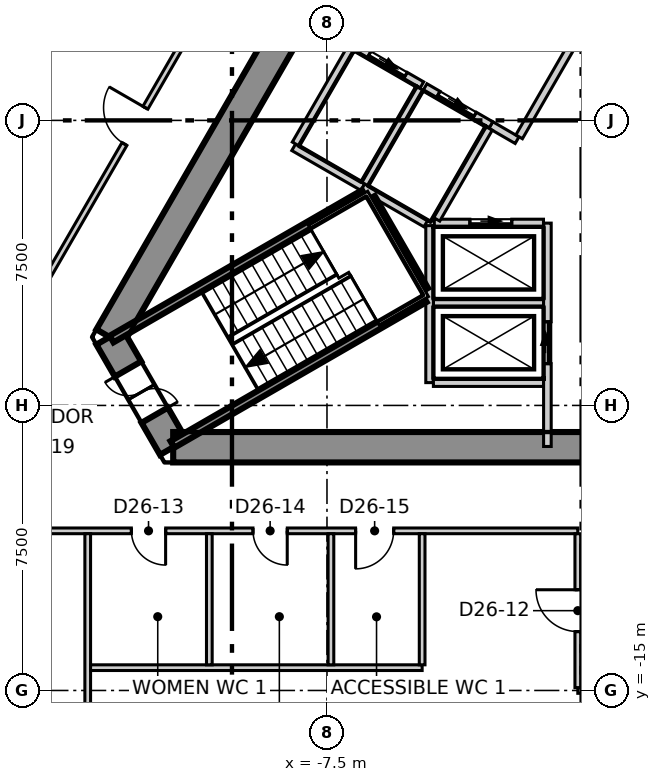
"""IFC4 building model, lengths in metres.
Left out: names, types, materials, properties, quantities, classifications, styles, units other than length and angle.
Written with IfcOpenShell. Run it as: python <this file> out.ifc"""

import sys

from ifc_helpers import new_model, si_unit, direction, frame, frame_2d, origin, place, context, subcontext, project, spatial, polyline, rectangle, outline, extrude, element, fill, save


model = new_model("IFC4")
c1 = context("Model", 3, precision=1e-05, world=origin(), true_north=direction((0.0, 1.0)))
c2 = subcontext(c1, "Body", "Model", "MODEL_VIEW")
j1 = project(units=[si_unit("LENGTHUNIT", "METRE"), si_unit("PLANEANGLEUNIT", "RADIAN")], contexts=[c1])
p1 = place(None, origin())
s1 = spatial("IfcSite", under=j1, at=p1, CompositionType="ELEMENT")
p2 = place(p1, origin())
s2 = spatial("IfcBuilding", under=s1, at=p2, CompositionType="ELEMENT")
p3 = place(p2, frame((0.0, 0.0, 116.3)))
s3 = spatial("IfcBuildingStorey", under=s2, at=p3, CompositionType="ELEMENT", Elevation=116.3)
p4 = place(p3, frame((-1.674, 14.3, -0.3), z_axis=(0.0, 0.0, 1.0), x_axis=(-0.499995765644, -0.866027848477, 0.0)))
e1 = element("IfcWall", 1, at=p4, inside=s3, PredefinedType="SHEAR", context=c2, shape_type="SweptSolid", body=[
    extrude(outline(polyline([(-0.231, -0.4), (1.732, -0.4), (3.695, -0.4), (5.658, -0.4), (7.621, -0.4), (9.584, -0.4), (11.547, -0.4), (13.51, -0.4), (15.473, -0.4), (17.436, -0.4), (19.399, -0.4), (21.362, -0.4), (23.325, -0.4), (22.863, 0.4), (20.977, 0.4), (19.091, 0.4), (17.205, 0.4), (15.319, 0.4), (13.433, 0.4), (11.547, 0.4), (9.661, 0.4), (7.775, 0.4), (5.889, 0.4), (4.003, 0.4), (2.117, 0.4), (0.231, 0.4), (-0.231, -0.4)])), origin(), (0.0, 0.0, 1.0), 4.0),
])
p5 = place(p4, frame((10.997, 0.0, 0.3)))
e2 = element("IfcOpeningElement", 2, at=p5, cuts=e1, PredefinedType="OPENING", context=c2, shape_type="SweptSolid", body=[
    extrude(rectangle(XDim=1.1, YDim=2.1, at=frame_2d((0.55, 1.05))), frame((0.0, 0.41, 0.0), z_axis=(0.0, -1.0, 0.0), x_axis=(1.0, 0.0, 0.0)), (0.0, 0.0, 1.0), 0.82),
])
p6 = place(p3, frame((-13.221, -5.7, -0.3), z_axis=(0.0, 0.0, 1.0), x_axis=(0.49987182685, -0.866099391942, 0.0)))
e3 = element("IfcWall", 3, at=p6, inside=s3, PredefinedType="SHEAR", context=c2, shape_type="SweptSolid", body=[
    extrude(outline(polyline([(-0.231, -0.4), (1.674, -0.4), (3.579, -0.4), (3.118, 0.4), (1.674, 0.4), (0.231, 0.4), (-0.231, -0.4)])), origin(), (0.0, 0.0, 1.0), 4.0),
])
p7 = place(p6, frame((0.974, 0.0, 0.3)))
e4 = element("IfcOpeningElement", 4, at=p7, cuts=e3, PredefinedType="OPENING", context=c2, shape_type="SweptSolid", body=[
    extrude(rectangle(XDim=1.4, YDim=2.1, at=frame_2d((0.7, 1.05))), frame((0.0, 0.41, 0.0), z_axis=(0.0, -1.0, 0.0), x_axis=(1.0, 0.0, 0.0)), (0.0, 0.0, 1.0), 0.82),
])
p8 = place(p3, frame((-11.547, -8.6, -0.3), z_axis=(0.0, 0.0, 1.0), x_axis=(1.0, 0.0, 0.0)))
e5 = element("IfcWall", 5, at=p8, inside=s3, PredefinedType="SHEAR", context=c2, shape_type="SweptSolid", body=[
    extrude(outline(polyline([(-0.231, -0.4), (1.732, -0.4), (3.695, -0.4), (5.658, -0.4), (7.621, -0.4), (9.584, -0.4), (11.547, -0.4), (13.51, -0.4), (15.473, -0.4), (17.436, -0.4), (19.399, -0.4), (21.362, -0.4), (23.325, -0.4), (22.863, 0.4), (20.977, 0.4), (19.091, 0.4), (17.205, 0.4), (15.319, 0.4), (13.433, 0.4), (11.547, 0.4), (9.661, 0.4), (7.775, 0.4), (5.889, 0.4), (4.003, 0.4), (2.117, 0.4), (0.231, 0.4), (-0.231, -0.4)])), origin(), (0.0, 0.0, 1.0), 4.0),
])
p9 = place(p8, frame((18.76, 0.0, 0.3)))
e6 = element("IfcOpeningElement", 6, at=p9, cuts=e5, PredefinedType="OPENING", context=c2, shape_type="SweptSolid", body=[
    extrude(rectangle(XDim=0.9, YDim=2.1, at=frame_2d((0.45, 1.05))), frame((0.0, 0.41, 0.0), z_axis=(0.0, -1.0, 0.0), x_axis=(1.0, 0.0, 0.0)), (0.0, 0.0, 1.0), 0.82),
])
p10 = place(p3, frame((-3.154, 35.185, 0.0), z_axis=(0.0, 0.0, 1.0), x_axis=(-0.499996704161, -0.866027306629, 0.0)))
e7 = element("IfcWall", 7, at=p10, inside=s3, PredefinedType="ELEMENTEDWALL", context=c2, shape_type="SweptSolid", body=[
    extrude(rectangle(XDim=57.769, YDim=0.2, at=frame_2d((28.884, 0.0))), origin(), (0.0, 0.0, 1.0), 3.7),
])
p11 = place(p10, frame((2.301, 0.0, 0.9)))
e8 = element("IfcOpeningElement", 8, at=p11, cuts=e7, PredefinedType="OPENING", context=c2, shape_type="SweptSolid", body=[
    extrude(rectangle(XDim=4.9, YDim=2.5, at=frame_2d((2.45, 1.25))), frame((0.0, 0.11, 0.0), z_axis=(0.0, -1.0, 0.0), x_axis=(1.0, 0.0, 0.0)), (0.0, 0.0, 1.0), 0.22),
])
p12 = place(p10, frame((9.199, 0.0, 0.9)))
e9 = element("IfcOpeningElement", 9, at=p12, cuts=e7, PredefinedType="OPENING", context=c2, shape_type="SweptSolid", body=[
    extrude(rectangle(XDim=4.9, YDim=2.5, at=frame_2d((2.45, 1.25))), frame((0.0, 0.11, 0.0), z_axis=(0.0, -1.0, 0.0), x_axis=(1.0, 0.0, 0.0)), (0.0, 0.0, 1.0), 0.22),
])
p13 = place(p10, frame((16.097, 0.0, 0.9)))
e10 = element("IfcOpeningElement", 10, at=p13, cuts=e7, PredefinedType="OPENING", context=c2, shape_type="SweptSolid", body=[
    extrude(rectangle(XDim=4.9, YDim=2.5, at=frame_2d((2.45, 1.25))), frame((0.0, 0.11, 0.0), z_axis=(0.0, -1.0, 0.0), x_axis=(1.0, 0.0, 0.0)), (0.0, 0.0, 1.0), 0.22),
])
p14 = place(p10, frame((22.995, 0.0, 0.9)))
e11 = element("IfcOpeningElement", 11, at=p14, cuts=e7, PredefinedType="OPENING", context=c2, shape_type="SweptSolid", body=[
    extrude(rectangle(XDim=4.9, YDim=2.5, at=frame_2d((2.45, 1.25))), frame((0.0, 0.11, 0.0), z_axis=(0.0, -1.0, 0.0), x_axis=(1.0, 0.0, 0.0)), (0.0, 0.0, 1.0), 0.22),
])
p15 = place(p10, frame((29.893, 0.0, 0.9)))
e12 = element("IfcOpeningElement", 12, at=p15, cuts=e7, PredefinedType="OPENING", context=c2, shape_type="SweptSolid", body=[
    extrude(rectangle(XDim=4.9, YDim=2.5, at=frame_2d((2.45, 1.25))), frame((0.0, 0.11, 0.0), z_axis=(0.0, -1.0, 0.0), x_axis=(1.0, 0.0, 0.0)), (0.0, 0.0, 1.0), 0.22),
])
p16 = place(p10, frame((36.791, 0.0, 0.9)))
e13 = element("IfcOpeningElement", 13, at=p16, cuts=e7, PredefinedType="OPENING", context=c2, shape_type="SweptSolid", body=[
    extrude(rectangle(XDim=4.9, YDim=2.5, at=frame_2d((2.45, 1.25))), frame((0.0, 0.11, 0.0), z_axis=(0.0, -1.0, 0.0), x_axis=(1.0, 0.0, 0.0)), (0.0, 0.0, 1.0), 0.22),
])
p17 = place(p10, frame((43.689, 0.0, 0.9)))
e14 = element("IfcOpeningElement", 14, at=p17, cuts=e7, PredefinedType="OPENING", context=c2, shape_type="SweptSolid", body=[
    extrude(rectangle(XDim=4.9, YDim=2.5, at=frame_2d((2.45, 1.25))), frame((0.0, 0.11, 0.0), z_axis=(0.0, -1.0, 0.0), x_axis=(1.0, 0.0, 0.0)), (0.0, 0.0, 1.0), 0.22),
])
p18 = place(p10, frame((50.586, 0.0, 0.9)))
e15 = element("IfcOpeningElement", 15, at=p18, cuts=e7, PredefinedType="OPENING", context=c2, shape_type="SweptSolid", body=[
    extrude(rectangle(XDim=4.9, YDim=2.5, at=frame_2d((2.45, 1.25))), frame((0.0, 0.11, 0.0), z_axis=(0.0, -1.0, 0.0), x_axis=(1.0, 0.0, 0.0)), (0.0, 0.0, 1.0), 0.22),
])
p19 = place(p3, frame((-18.555, -10.8, 0.0), z_axis=(0.0, 0.0, 1.0), x_axis=(1.0, 0.0, 0.0)))
e16 = element("IfcWall", 16, at=p19, inside=s3, PredefinedType="PARTITIONING", context=c2, shape_type="SweptSolid", body=[
    extrude(rectangle(XDim=17.654, YDim=0.15, at=frame_2d((8.827, 0.0))), origin(), (0.0, 0.0, 1.0), 3.7),
])
p20 = place(p19, frame((1.8, 0.0, 0.0)))
e17 = element("IfcOpeningElement", 17, at=p20, cuts=e16, PredefinedType="OPENING", context=c2, shape_type="SweptSolid", body=[
    extrude(rectangle(XDim=1.1, YDim=2.1, at=frame_2d((0.55, 1.05))), frame((0.0, 0.085, 0.0), z_axis=(0.0, -1.0, 0.0), x_axis=(1.0, 0.0, 0.0)), (0.0, 0.0, 1.0), 0.17),
])
p21 = place(p19, frame((5.909, 0.0, 0.0)))
e18 = element("IfcOpeningElement", 18, at=p21, cuts=e16, PredefinedType="OPENING", context=c2, shape_type="SweptSolid", body=[
    extrude(rectangle(XDim=0.9, YDim=2.1, at=frame_2d((0.45, 1.05))), frame((0.0, 0.085, 0.0), z_axis=(0.0, -1.0, 0.0), x_axis=(1.0, 0.0, 0.0)), (0.0, 0.0, 1.0), 0.17),
])
p22 = place(p19, frame((9.109, 0.0, 0.0)))
e19 = element("IfcOpeningElement", 19, at=p22, cuts=e16, PredefinedType="OPENING", context=c2, shape_type="SweptSolid", body=[
    extrude(rectangle(XDim=0.9, YDim=2.1, at=frame_2d((0.45, 1.05))), frame((0.0, 0.085, 0.0), z_axis=(0.0, -1.0, 0.0), x_axis=(1.0, 0.0, 0.0)), (0.0, 0.0, 1.0), 0.17),
])
p23 = place(p19, frame((11.809, 0.0, 0.0)))
e20 = element("IfcOpeningElement", 20, at=p23, cuts=e16, PredefinedType="OPENING", context=c2, shape_type="SweptSolid", body=[
    extrude(rectangle(XDim=1.0, YDim=2.1, at=frame_2d((0.5, 1.05))), frame((0.0, 0.085, 0.0), z_axis=(0.0, -1.0, 0.0), x_axis=(1.0, 0.0, 0.0)), (0.0, 0.0, 1.0), 0.17),
])
p24 = place(p3, frame((-18.631, -10.67, 0.0), z_axis=(0.0, 0.0, 1.0), x_axis=(0.499981532133, 0.86603606595, 0.0)))
e21 = element("IfcWall", 21, at=p24, inside=s3, PredefinedType="PARTITIONING", context=c2, shape_type="SweptSolid", body=[
    extrude(rectangle(XDim=24.553, YDim=0.15, at=frame_2d((12.277, 0.0))), origin(), (0.0, 0.0, 1.0), 3.7),
])
p25 = place(p24, frame((11.604, 0.0, 0.0)))
e22 = element("IfcOpeningElement", 22, at=p25, cuts=e21, PredefinedType="OPENING", context=c2, shape_type="SweptSolid", body=[
    extrude(rectangle(XDim=1.1, YDim=2.1, at=frame_2d((0.55, 1.05))), frame((0.0, 0.085, 0.0), z_axis=(0.0, -1.0, 0.0), x_axis=(1.0, 0.0, 0.0)), (0.0, 0.0, 1.0), 0.17),
])
p26 = place(p3, frame((-13.796, -20.244, 0.0), z_axis=(0.0, 0.0, 1.0), x_axis=(0.0, 1.0, 0.0)))
e23 = element("IfcWall", 23, at=p26, inside=s3, PredefinedType="PARTITIONING", context=c2, shape_type="SweptSolid", body=[
    extrude(rectangle(XDim=9.369, YDim=0.15, at=frame_2d((4.685, 0.0))), origin(), (0.0, 0.0, 1.0), 3.7),
])
p27 = place(p3, frame((-13.721, -14.4, 0.0), z_axis=(0.0, 0.0, 1.0), x_axis=(1.0, 0.0, 0.0)))
e24 = element("IfcWall", 24, at=p27, inside=s3, PredefinedType="PARTITIONING", context=c2, shape_type="SweptSolid", body=[
    extrude(rectangle(XDim=8.725, YDim=0.15, at=frame_2d((4.362, 0.0))), origin(), (0.0, 0.0, 1.0), 3.7),
])
for number, where, z_axis, x_axis in (
    (25, (-10.596, -14.325, 0.0), (0.0, 0.0, 1.0), (0.0, 1.0, 0.0)),
    (26, (-4.996, -14.325, 0.0), (0.0, 0.0, 1.0), (0.0, 1.0, 0.0)),
    (27, (-7.396, -14.325, 0.0), (0.0, 0.0, 1.0), (0.0, 1.0, 0.0)),
):
    element("IfcWall", number, at=place(p3, frame(where, z_axis=z_axis, x_axis=x_axis)), inside=s3, PredefinedType="PARTITIONING", context=c2, shape_type="SweptSolid", body=[
        extrude(rectangle(XDim=3.45, YDim=0.15, at=frame_2d((1.725, 0.0))), origin(), (0.0, 0.0, 1.0), 3.7),
    ])
p28 = place(p3, frame((-0.9, -15.0, 0.0), z_axis=(0.0, 0.0, 1.0), x_axis=(1.0, 0.0, 0.0)))
e28 = element("IfcWall", 28, at=p28, inside=s3, PredefinedType="PARTITIONING", context=c2, shape_type="SweptSolid", body=[
    extrude(rectangle(XDim=1.8, YDim=0.15, at=frame_2d((0.9, 0.0))), origin(), (0.0, 0.0, 1.0), 3.7),
])
p29 = place(p3, frame((-0.9, -14.925, 0.0), z_axis=(0.0, 0.0, 1.0), x_axis=(0.0, 1.0, 0.0)))
e29 = element("IfcWall", 29, at=p29, inside=s3, PredefinedType="PARTITIONING", context=c2, shape_type="SweptSolid", body=[
    extrude(rectangle(XDim=4.049, YDim=0.15, at=frame_2d((2.024, 0.0))), origin(), (0.0, 0.0, 1.0), 3.7),
])
p30 = place(p29, frame((1.475, 0.0, 0.0)))
e30 = element("IfcOpeningElement", 30, at=p30, cuts=e29, PredefinedType="OPENING", context=c2, shape_type="SweptSolid", body=[
    extrude(rectangle(XDim=1.1, YDim=2.1, at=frame_2d((0.55, 1.05))), frame((0.0, 0.085, 0.0), z_axis=(0.0, -1.0, 0.0), x_axis=(1.0, 0.0, 0.0)), (0.0, 0.0, 1.0), 0.17),
])
p31 = place(p3, frame((-8.376, -0.707, 0.0), z_axis=(0.0, 0.0, 1.0), x_axis=(0.866067520717, -0.499927044236, 0.0)))
e31 = element("IfcWall", 31, at=p31, inside=s3, PredefinedType="SOLIDWALL", context=c2, shape_type="SweptSolid", body=[
    extrude(rectangle(XDim=2.1, YDim=0.2, at=frame_2d((1.05, 0.0))), origin(), (0.0, 0.0, 1.0), 3.7),
])
p32 = place(p3, frame((-8.326, -0.62, 0.0), z_axis=(0.0, 0.0, 1.0), x_axis=(0.500023687443, 0.866011727401, 0.0)))
e32 = element("IfcWall", 32, at=p32, inside=s3, PredefinedType="SOLIDWALL", context=c2, shape_type="SweptSolid", body=[
    extrude(rectangle(XDim=2.9, YDim=0.2, at=frame_2d((1.45, 0.0))), origin(), (0.0, 0.0, 1.0), 3.7),
])
p33 = place(p3, frame((-4.7, -4.8, 0.0), z_axis=(0.0, 0.0, 1.0), x_axis=(1.0, 0.0, 0.0)))
e33 = element("IfcWall", 33, at=p33, inside=s3, PredefinedType="SOLIDWALL", context=c2, shape_type="SweptSolid", body=[
    extrude(rectangle(XDim=2.9, YDim=0.2, at=frame_2d((1.45, 0.0))), origin(), (0.0, 0.0, 1.0), 3.7),
])
p34 = place(p3, frame((-4.8, -6.9, 0.0), z_axis=(0.0, 0.0, 1.0), x_axis=(0.0, 1.0, 0.0)))
e34 = element("IfcWall", 34, at=p34, inside=s3, PredefinedType="SOLIDWALL", context=c2, shape_type="SweptSolid", body=[
    extrude(rectangle(XDim=4.131, YDim=0.2, at=frame_2d((2.065, 0.0))), origin(), (0.0, 0.0, 1.0), 3.7),
])
p35 = place(p3, frame((-4.7, -6.9, 0.0), z_axis=(0.0, 0.0, 1.0), x_axis=(1.0, 0.0, 0.0)))
e35 = element("IfcWall", 35, at=p35, inside=s3, PredefinedType="SOLIDWALL", context=c2, shape_type="SweptSolid", body=[
    extrude(rectangle(XDim=2.9, YDim=0.2, at=frame_2d((1.45, 0.0))), origin(), (0.0, 0.0, 1.0), 3.7),
])
p36 = place(p3, frame((-1.7, -8.58, 0.0), z_axis=(0.0, 0.0, 1.0), x_axis=(0.0, 1.0, 0.0)))
e36 = element("IfcWall", 36, at=p36, inside=s3, PredefinedType="SOLIDWALL", context=c2, shape_type="SweptSolid", body=[
    extrude(rectangle(XDim=5.877, YDim=0.2, at=frame_2d((2.938, 0.0))), origin(), (0.0, 0.0, 1.0), 3.7),
])
p37 = place(p36, frame((2.18, 0.0, 0.0)))
e37 = element("IfcOpeningElement", 37, at=p37, cuts=e36, PredefinedType="OPENING", context=c2, shape_type="SweptSolid", body=[
    extrude(rectangle(XDim=1.1, YDim=2.1, at=frame_2d((0.55, 1.05))), frame((0.0, 0.11, 0.0), z_axis=(0.0, -1.0, 0.0), x_axis=(1.0, 0.0, 0.0)), (0.0, 0.0, 1.0), 0.22),
])
p38 = place(p3, frame((-4.676, -2.7, 0.0), z_axis=(0.0, 0.0, 1.0), x_axis=(1.0, 0.0, 0.0)))
e38 = element("IfcWall", 38, at=p38, inside=s3, PredefinedType="SOLIDWALL", context=c2, shape_type="SweptSolid", body=[
    extrude(rectangle(XDim=2.873, YDim=0.2, at=frame_2d((1.437, 0.0))), origin(), (0.0, 0.0, 1.0), 3.7),
])
p39 = place(p38, frame((0.937, 0.0, 0.0)))
e39 = element("IfcOpeningElement", 39, at=p39, cuts=e38, PredefinedType="OPENING", context=c2, shape_type="SweptSolid", body=[
    extrude(rectangle(XDim=1.1, YDim=2.1, at=frame_2d((0.55, 1.05))), frame((0.0, 0.11, 0.0), z_axis=(0.0, -1.0, 0.0), x_axis=(1.0, 0.0, 0.0)), (0.0, 0.0, 1.0), 0.22),
])
p40 = place(p3, frame((-8.28, 2.818, 0.0), z_axis=(0.0, 0.0, 1.0), x_axis=(0.86600175068, -0.50004096614, 0.0)))
e40 = element("IfcWall", 40, at=p40, inside=s3, PredefinedType="SOLIDWALL", context=c2, shape_type="SweptSolid", body=[
    extrude(rectangle(XDim=3.782, YDim=0.2, at=frame_2d((1.891, 0.0))), origin(), (0.0, 0.0, 1.0), 3.7),
])
p41 = place(p40, frame((2.18, 0.0, 0.0)))
e41 = element("IfcOpeningElement", 41, at=p41, cuts=e40, PredefinedType="OPENING", context=c2, shape_type="SweptSolid", body=[
    extrude(rectangle(XDim=1.1, YDim=2.1, at=frame_2d((0.55, 1.05))), frame((0.0, 0.11, 0.0), z_axis=(0.0, -1.0, 0.0), x_axis=(1.0, 0.0, 0.0)), (0.0, 0.0, 1.0), 0.22),
])
p42 = place(p3, frame((-3.188, -0.122, 0.0), z_axis=(0.0, 0.0, 1.0), x_axis=(0.865705793592, -0.50055317294, 0.0)))
e42 = element("IfcWall", 42, at=p42, inside=s3, PredefinedType="SOLIDWALL", context=c2, shape_type="SweptSolid", body=[
    extrude(rectangle(XDim=0.797, YDim=0.2, at=frame_2d((0.398, 0.0))), origin(), (0.0, 0.0, 1.0), 3.7),
])
p43 = place(p3, frame((-2.444, -0.433, 0.0), z_axis=(0.0, 0.0, 1.0), x_axis=(0.500035624827, 0.866004834804, 0.0)))
e43 = element("IfcWall", 43, at=p43, inside=s3, PredefinedType="SOLIDWALL", context=c2, shape_type="SweptSolid", body=[
    extrude(rectangle(XDim=3.194, YDim=0.2, at=frame_2d((1.597, 0.0))), origin(), (0.0, 0.0, 1.0), 3.7),
])
p44 = place(p3, frame((-6.557, -1.757, 0.0), z_axis=(0.0, 0.0, 1.0), x_axis=(0.8659754619, -0.500086491905, 0.0)))
e44 = element("IfcWall", 44, at=p44, inside=s3, PredefinedType="SOLIDWALL", context=c2, shape_type="SweptSolid", body=[
    extrude(rectangle(XDim=1.916, YDim=0.2, at=frame_2d((0.958, 0.0))), origin(), (0.0, 0.0, 1.0), 3.7),
])
p45 = place(p3, frame((-6.507, -1.67, 0.0), z_axis=(0.0, 0.0, 1.0), x_axis=(0.50012328804, 0.865954211699, 0.0)))
e45 = element("IfcWall", 45, at=p45, inside=s3, PredefinedType="SOLIDWALL", context=c2, shape_type="SweptSolid", body=[
    extrude(rectangle(XDim=2.9, YDim=0.2, at=frame_2d((1.45, 0.0))), origin(), (0.0, 0.0, 1.0), 3.7),
])
p46 = place(p3, frame((-4.92, 0.878, 0.0), z_axis=(0.0, 0.0, 1.0), x_axis=(0.866010750942, -0.50002537861, 0.0)))
e46 = element("IfcWall", 46, at=p46, inside=s3, PredefinedType="SOLIDWALL", context=c2, shape_type="SweptSolid", body=[
    extrude(rectangle(XDim=2.0, YDim=0.2, at=frame_2d((1.0, 0.0))), origin(), (0.0, 0.0, 1.0), 3.7),
])
p47 = place(p46, frame((0.4, 0.0, 0.0)))
e47 = element("IfcOpeningElement", 47, at=p47, cuts=e46, PredefinedType="OPENING", context=c2, shape_type="SweptSolid", body=[
    extrude(rectangle(XDim=1.1, YDim=2.1, at=frame_2d((0.55, 1.05))), frame((0.0, 0.11, 0.0), z_axis=(0.0, -1.0, 0.0), x_axis=(1.0, 0.0, 0.0)), (0.0, 0.0, 1.0), 0.22),
])
p48 = place(p3, frame((-4.619, -2.6, 0.0), z_axis=(0.0, 0.0, 1.0), x_axis=(0.50009492287, 0.865970593103, 0.0)))
e48 = element("IfcWall", 48, at=p48, inside=s3, PredefinedType="SOLIDWALL", context=c2, shape_type="SweptSolid", body=[
    extrude(rectangle(XDim=2.761, YDim=0.2, at=frame_2d((1.381, 0.0))), origin(), (0.0, 0.0, 1.0), 3.7),
])
p49 = place(p3, frame((-13.167, -5.754, 0.0), z_axis=(0.0, 0.0, 1.0), x_axis=(0.866060938598, 0.499938446846, 0.0)))
e49 = element("IfcWall", 49, at=p49, inside=s3, PredefinedType="SOLIDWALL", context=c2, shape_type="SweptSolid", body=[
    extrude(rectangle(XDim=7.665, YDim=0.2, at=frame_2d((3.832, 0.0))), origin(), (0.0, 0.0, 1.0), 3.7),
])
p50 = place(p3, frame((-6.329, -2.038, 0.0), z_axis=(0.0, 0.0, 1.0), x_axis=(0.500200581029, -0.865909567298, 0.0)))
e50 = element("IfcWall", 50, at=p50, inside=s3, PredefinedType="SOLIDWALL", context=c2, shape_type="SweptSolid", body=[
    extrude(rectangle(XDim=2.799, YDim=0.2, at=frame_2d((1.399, 0.0))), origin(), (0.0, 0.0, 1.0), 3.7),
])
p51 = place(p3, frame((-11.567, -8.526, 0.0), z_axis=(0.0, 0.0, 1.0), x_axis=(0.866005769735, 0.50003400563, 0.0)))
e51 = element("IfcWall", 51, at=p51, inside=s3, PredefinedType="SOLIDWALL", context=c2, shape_type="SweptSolid", body=[
    extrude(rectangle(XDim=7.665, YDim=0.2, at=frame_2d((3.833, 0.0))), origin(), (0.0, 0.0, 1.0), 3.7),
])
p52 = place(p39, origin())
e52 = element("IfcDoor", 52, at=p52, inside=s3, OperationType="SLIDING_TO_LEFT", PredefinedType="DOOR", context=c2, shape_type="SweptSolid", body=[
    extrude(rectangle(XDim=1.1, YDim=2.1, at=frame_2d((0.55, 1.05))), frame((0.0, 0.025, 0.0), z_axis=(0.0, -1.0, 0.0), x_axis=(1.0, 0.0, 0.0)), (0.0, 0.0, 1.0), 0.05),
])
fill(e39, e52)
p53 = place(p37, origin())
e53 = element("IfcDoor", 53, at=p53, inside=s3, OperationType="SLIDING_TO_LEFT", PredefinedType="DOOR", context=c2, shape_type="SweptSolid", body=[
    extrude(rectangle(XDim=1.1, YDim=2.1, at=frame_2d((0.55, 1.05))), frame((0.0, 0.025, 0.0), z_axis=(0.0, -1.0, 0.0), x_axis=(1.0, 0.0, 0.0)), (0.0, 0.0, 1.0), 0.05),
])
fill(e37, e53)
p54 = place(p47, origin())
e54 = element("IfcDoor", 54, at=p54, inside=s3, OperationType="SLIDING_TO_LEFT", PredefinedType="DOOR", context=c2, shape_type="SweptSolid", body=[
    extrude(rectangle(XDim=1.1, YDim=2.1, at=frame_2d((0.55, 1.05))), frame((0.0, 0.025, 0.0), z_axis=(0.0, -1.0, 0.0), x_axis=(1.0, 0.0, 0.0)), (0.0, 0.0, 1.0), 0.05),
])
fill(e47, e54)
p55 = place(p41, origin())
e55 = element("IfcDoor", 55, at=p55, inside=s3, OperationType="SLIDING_TO_LEFT", PredefinedType="DOOR", context=c2, shape_type="SweptSolid", body=[
    extrude(rectangle(XDim=1.1, YDim=2.1, at=frame_2d((0.55, 1.05))), frame((0.0, 0.025, 0.0), z_axis=(0.0, -1.0, 0.0), x_axis=(1.0, 0.0, 0.0)), (0.0, 0.0, 1.0), 0.05),
])
fill(e41, e55)
p56 = place(p30, origin())
e56 = element("IfcDoor", 56, at=p56, inside=s3, OperationType="SINGLE_SWING_LEFT", PredefinedType="DOOR", context=c2, shape_type="SweptSolid", body=[
    extrude(rectangle(XDim=1.1, YDim=2.1, at=frame_2d((0.55, 1.05))), frame((0.0, 0.025, 0.0), z_axis=(0.0, -1.0, 0.0), x_axis=(1.0, 0.0, 0.0)), (0.0, 0.0, 1.0), 0.05),
])
fill(e30, e56)
p57 = place(p21, origin())
e57 = element("IfcDoor", 57, at=p57, inside=s3, OperationType="SINGLE_SWING_RIGHT", PredefinedType="DOOR", context=c2, shape_type="SweptSolid", body=[
    extrude(rectangle(XDim=0.9, YDim=2.1, at=frame_2d((0.45, 1.05))), frame((0.0, 0.025, 0.0), z_axis=(0.0, -1.0, 0.0), x_axis=(1.0, 0.0, 0.0)), (0.0, 0.0, 1.0), 0.05),
])
fill(e18, e57)
p58 = place(p22, origin())
e58 = element("IfcDoor", 58, at=p58, inside=s3, OperationType="SINGLE_SWING_RIGHT", PredefinedType="DOOR", context=c2, shape_type="SweptSolid", body=[
    extrude(rectangle(XDim=0.9, YDim=2.1, at=frame_2d((0.45, 1.05))), frame((0.0, 0.025, 0.0), z_axis=(0.0, -1.0, 0.0), x_axis=(1.0, 0.0, 0.0)), (0.0, 0.0, 1.0), 0.05),
])
fill(e19, e58)
p59 = place(p23, origin())
e59 = element("IfcDoor", 59, at=p59, inside=s3, OperationType="SINGLE_SWING_LEFT", PredefinedType="DOOR", context=c2, shape_type="SweptSolid", body=[
    extrude(rectangle(XDim=1.0, YDim=2.1, at=frame_2d((0.5, 1.05))), frame((0.0, 0.025, 0.0), z_axis=(0.0, -1.0, 0.0), x_axis=(1.0, 0.0, 0.0)), (0.0, 0.0, 1.0), 0.05),
])
fill(e20, e59)
p60 = place(p25, origin())
e60 = element("IfcDoor", 60, at=p60, inside=s3, OperationType="SINGLE_SWING_LEFT", PredefinedType="DOOR", context=c2, shape_type="SweptSolid", body=[
    extrude(rectangle(XDim=1.1, YDim=2.1, at=frame_2d((0.55, 1.05))), frame((0.0, 0.025, 0.0), z_axis=(0.0, -1.0, 0.0), x_axis=(1.0, 0.0, 0.0)), (0.0, 0.0, 1.0), 0.05),
])
fill(e22, e60)
p61 = place(p7, origin())
e61 = element("IfcDoor", 61, at=p61, inside=s3, OperationType="DOUBLE_DOOR_SINGLE_SWING", PredefinedType="DOOR", context=c2, shape_type="SweptSolid", body=[
    extrude(rectangle(XDim=1.4, YDim=2.1, at=frame_2d((0.7, 1.05))), frame((0.0, 0.025, 0.0), z_axis=(0.0, -1.0, 0.0), x_axis=(1.0, 0.0, 0.0)), (0.0, 0.0, 1.0), 0.05),
])
fill(e4, e61)
save(model, sys.argv[1])
